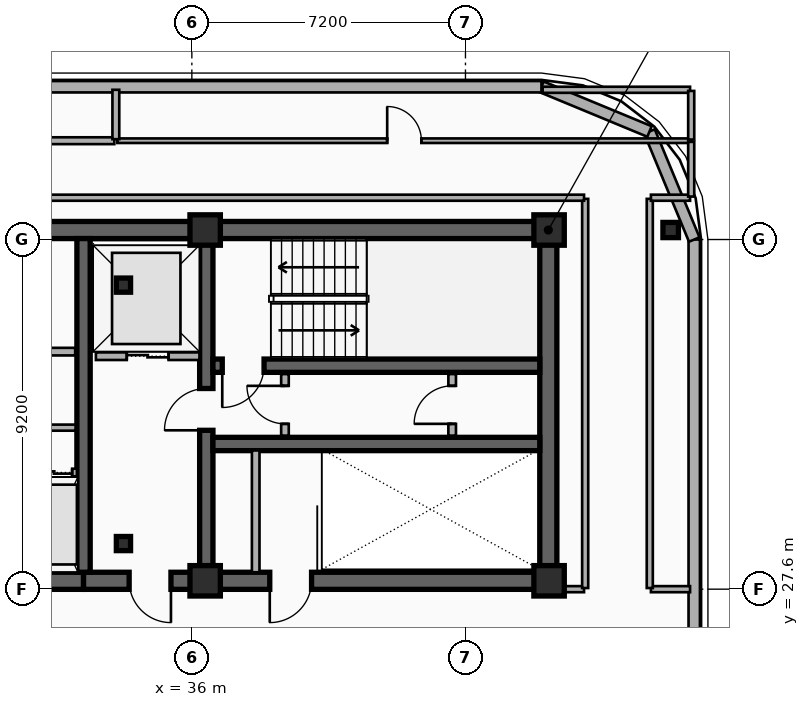
"""IFC4 building model, lengths in metres.
Left out: names, types, materials, properties, quantities, classifications, styles, units other than length and angle.
Written with IfcOpenShell. Run it as: python <this file> out.ifc"""

import sys

from ifc_helpers import new_model, si_unit, direction, frame, frame_2d, origin, origin_2d, place, context, subcontext, project, spatial, rectangle, i_section, extrude, element, fill, save


model = new_model("IFC4")
c1 = context("Model", 3, precision=1e-05, world=origin(), true_north=direction((0.0, 1.0)))
c2 = subcontext(c1, "Body", "Model", "MODEL_VIEW")
j1 = project(units=[si_unit("LENGTHUNIT", "METRE"), si_unit("PLANEANGLEUNIT", "RADIAN")], contexts=[c1])
p1 = place(None, origin())
s1 = spatial("IfcSite", under=j1, at=p1, CompositionType="ELEMENT")
p2 = place(p1, origin())
s2 = spatial("IfcBuilding", under=s1, at=p2, CompositionType="ELEMENT")
p3 = place(p2, frame((0.0, 0.0, 276.9)))
s3 = spatial("IfcBuildingStorey", under=s2, at=p3, CompositionType="ELEMENT", Elevation=276.9)
p4 = place(p3, frame((12.15, 37.05, 0.0), z_axis=(0.0, 0.0, 1.0), x_axis=(1.0, 0.0, 0.0)))
e1 = element("IfcWall", 1, at=p4, inside=s3, PredefinedType="SHEAR", context=c2, shape_type="SweptSolid", body=[
    extrude(rectangle(XDim=33.23, YDim=0.45, at=frame_2d((16.615, 0.0))), origin(), (0.0, 0.0, 1.0), 3.7),
])
p5 = place(p3, frame((33.15, 27.82, 0.0), z_axis=(0.0, 0.0, 1.0), x_axis=(-1.0, 0.0, 0.0)))
e2 = element("IfcWall", 2, at=p5, inside=s3, PredefinedType="SHEAR", context=c2, shape_type="SweptSolid", body=[
    extrude(rectangle(XDim=11.97, YDim=0.45, at=frame_2d((5.985, 0.0))), origin(), (0.0, 0.0, 1.0), 3.7),
])
p6 = place(p5, frame((6.1, 0.0, 0.0)))
e3 = element("IfcOpeningElement", 3, at=p6, cuts=e2, PredefinedType="OPENING", context=c2, shape_type="SweptSolid", body=[
    extrude(rectangle(XDim=1.6, YDim=2.2, at=frame_2d((0.8, 1.1))), frame((0.0, 0.235, 0.0), z_axis=(0.0, -1.0, 0.0), x_axis=(1.0, 0.0, 0.0)), (0.0, 0.0, 1.0), 0.47),
])
p7 = place(p3, frame((45.38, 27.82, 0.0), z_axis=(0.0, 0.0, 1.0), x_axis=(-1.0, 0.0, 0.0)))
e4 = element("IfcWall", 4, at=p7, inside=s3, PredefinedType="SHEAR", context=c2, shape_type="SweptSolid", body=[
    extrude(rectangle(XDim=12.23, YDim=0.45, at=frame_2d((6.115, 0.0))), origin(), (0.0, 0.0, 1.0), 3.7),
])
p8 = place(p7, frame((9.93, 0.0, 0.0)))
e5 = element("IfcOpeningElement", 5, at=p8, cuts=e4, PredefinedType="OPENING", context=c2, shape_type="SweptSolid", body=[
    extrude(rectangle(XDim=1.1, YDim=2.15, at=frame_2d((0.55, 1.075))), frame((0.0, 0.235, 0.0), z_axis=(0.0, -1.0, 0.0), x_axis=(1.0, 0.0, 0.0)), (0.0, 0.0, 1.0), 0.47),
])
p9 = place(p7, frame((6.23, 0.0, 0.0)))
e6 = element("IfcOpeningElement", 6, at=p9, cuts=e4, PredefinedType="OPENING", context=c2, shape_type="SweptSolid", body=[
    extrude(rectangle(XDim=1.1, YDim=2.15, at=frame_2d((0.55, 1.075))), frame((0.0, 0.235, 0.0), z_axis=(0.0, -1.0, 0.0), x_axis=(1.0, 0.0, 0.0)), (0.0, 0.0, 1.0), 0.47),
])
p10 = place(p3, frame((45.38, 28.045, 0.0), z_axis=(0.0, 0.0, 1.0), x_axis=(0.0, 1.0, 0.0)))
e7 = element("IfcWall", 7, at=p10, inside=s3, PredefinedType="SHEAR", context=c2, shape_type="SweptSolid", body=[
    extrude(rectangle(XDim=8.78, YDim=0.45, at=frame_2d((4.39, 0.0))), origin(), (0.0, 0.0, 1.0), 3.7),
])
p11 = place(p3, frame((33.15, 28.045, 0.0), z_axis=(0.0, 0.0, 1.0), x_axis=(0.0, 1.0, 0.0)))
e8 = element("IfcWall", 8, at=p11, inside=s3, PredefinedType="SHEAR", context=c2, shape_type="SweptSolid", body=[
    extrude(rectangle(XDim=8.78, YDim=0.35, at=frame_2d((4.39, 0.0))), origin(), (0.0, 0.0, 1.0), 3.7),
])
p12 = place(p3, frame((36.38, 28.045, 0.0), z_axis=(0.0, 0.0, 1.0), x_axis=(0.0, 1.0, 0.0)))
e9 = element("IfcWall", 9, at=p12, inside=s3, PredefinedType="SHEAR", context=c2, shape_type="SweptSolid", body=[
    extrude(rectangle(XDim=8.78, YDim=0.35, at=frame_2d((4.39, 0.0))), origin(), (0.0, 0.0, 1.0), 3.7),
])
p13 = place(p12, frame((3.735, 0.0, 0.0)))
e10 = element("IfcOpeningElement", 10, at=p13, cuts=e9, PredefinedType="OPENING", context=c2, shape_type="SweptSolid", body=[
    extrude(rectangle(XDim=1.1, YDim=2.15, at=frame_2d((0.55, 1.075))), frame((0.0, 0.185, 0.0), z_axis=(0.0, -1.0, 0.0), x_axis=(1.0, 0.0, 0.0)), (0.0, 0.0, 1.0), 0.37),
])
p14 = place(p3, frame((45.155, 33.48, 0.0), z_axis=(0.0, 0.0, 1.0), x_axis=(-1.0, 0.0, 0.0)))
e11 = element("IfcWall", 11, at=p14, inside=s3, PredefinedType="SHEAR", context=c2, shape_type="SweptSolid", body=[
    extrude(rectangle(XDim=8.6, YDim=0.35, at=frame_2d((4.3, 0.0))), origin(), (0.0, 0.0, 1.0), 3.7),
])
p15 = place(p14, frame((7.255, 0.0, 0.0)))
e12 = element("IfcOpeningElement", 12, at=p15, cuts=e11, PredefinedType="OPENING", context=c2, shape_type="SweptSolid", body=[
    extrude(rectangle(XDim=1.1, YDim=2.15, at=frame_2d((0.55, 1.075))), frame((0.0, 0.185, 0.0), z_axis=(0.0, -1.0, 0.0), x_axis=(1.0, 0.0, 0.0)), (0.0, 0.0, 1.0), 0.37),
])
p16 = place(p3, frame((36.555, 31.42, 0.0), z_axis=(0.0, 0.0, 1.0), x_axis=(1.0, 0.0, 0.0)))
e13 = element("IfcWall", 13, at=p16, inside=s3, PredefinedType="SHEAR", context=c2, shape_type="SweptSolid", body=[
    extrude(rectangle(XDim=8.6, YDim=0.35, at=frame_2d((4.3, 0.0))), origin(), (0.0, 0.0, 1.0), 3.7),
])
for number, where, z_axis, x_axis in (
    (14, (34.2, 28.8, 0.0), (0.0, 0.0, 1.0), (1.0, 0.0, 0.0)),
    (15, (34.2, 35.6, 0.0), (0.0, 0.0, 1.0), (1.0, 0.0, 0.0)),
):
    element("IfcColumn", number, at=place(p3, frame(where, z_axis=z_axis, x_axis=x_axis)), inside=s3, PredefinedType="COLUMN", context=c2, shape_type="SweptSolid", body=[
        extrude(i_section(OverallWidth=0.374, OverallDepth=0.372, WebThickness=0.017, FlangeThickness=0.027, FilletRadius=0.015, at=origin_2d()), origin(), (0.0, 0.0, 1.0), 3.7),
    ])
for number, where, z_axis, x_axis in (
    (16, (36.35, 27.82, 0.0), (0.0, 0.0, 1.0), (1.0, 0.0, 0.0)),
    (17, (36.35, 37.05, 0.0), (0.0, 0.0, 1.0), (1.0, 0.0, 0.0)),
    (18, (45.4, 27.82, 0.0), (0.0, 0.0, 1.0), (1.0, 0.0, 0.0)),
    (19, (45.4, 37.05, 0.0), (0.0, 0.0, 1.0), (1.0, 0.0, 0.0)),
):
    element("IfcColumn", number, at=place(p3, frame(where, z_axis=z_axis, x_axis=x_axis)), inside=s3, PredefinedType="COLUMN", context=c2, shape_type="SweptSolid", body=[
        extrude(rectangle(XDim=0.8, YDim=0.8, at=origin_2d()), origin(), (0.0, 0.0, 1.0), 3.7),
    ])
p17 = place(p3, frame((48.6, 37.05, 0.0), z_axis=(0.0, 0.0, 1.0), x_axis=(1.0, 0.0, 0.0)))
e20 = element("IfcColumn", 20, at=p17, inside=s3, PredefinedType="COLUMN", context=c2, shape_type="SweptSolid", body=[
    extrude(i_section(OverallWidth=0.408, OverallDepth=0.4, WebThickness=0.025, FlangeThickness=0.039, FilletRadius=0.015, at=origin_2d()), origin(), (0.0, 0.0, 1.0), 3.7),
])
p18 = place(p3, frame((49.22, 36.8, 0.0), z_axis=(0.0, 0.0, 1.0), x_axis=(0.0, -1.0, 0.0)))
e21 = element("IfcWall", 21, at=p18, inside=s3, PredefinedType="SOLIDWALL", context=c2, shape_type="SweptSolid", body=[
    extrude(rectangle(XDim=34.2, YDim=0.3, at=frame_2d((17.1, 0.0))), origin(), (0.0, 0.0, 1.0), 3.38),
])
p19 = place(p18, frame((21.127, 0.0, 0.75)))
e22 = element("IfcOpeningElement", 22, at=p19, cuts=e21, PredefinedType="OPENING", context=c2, shape_type="SweptSolid", body=[
    extrude(rectangle(XDim=2.1, YDim=2.1, at=frame_2d((1.05, 1.05))), frame((0.0, 0.16, 0.0), z_axis=(0.0, -1.0, 0.0), x_axis=(1.0, 0.0, 0.0)), (0.0, 0.0, 1.0), 0.32),
])
p20 = place(p18, frame((27.503, 0.0, 0.75)))
e23 = element("IfcOpeningElement", 23, at=p20, cuts=e21, PredefinedType="OPENING", context=c2, shape_type="SweptSolid", body=[
    extrude(rectangle(XDim=2.1, YDim=2.1, at=frame_2d((1.05, 1.05))), frame((0.0, 0.16, 0.0), z_axis=(0.0, -1.0, 0.0), x_axis=(1.0, 0.0, 0.0)), (0.0, 0.0, 1.0), 0.32),
])
for number, where, z_axis, x_axis in (
    (24, (48.042, 39.643, 0.0), (0.0, 0.0, 1.0), (0.383, -0.924, 0.0)),
    (25, (45.2, 40.82, 0.0), (0.0, 0.0, 1.0), (0.924, -0.383, 0.0)),
):
    element("IfcWall", number, at=place(p3, frame(where, z_axis=z_axis, x_axis=x_axis)), inside=s3, PredefinedType="SOLIDWALL", context=c2, shape_type="SweptSolid", body=[
        extrude(rectangle(XDim=3.077, YDim=0.3, at=frame_2d((1.538, 0.0))), origin(), (0.0, 0.0, 1.0), 3.38),
    ])
p21 = place(p3, frame((12.4, 40.82, 0.0), z_axis=(0.0, 0.0, 1.0), x_axis=(1.0, 0.0, 0.0)))
e26 = element("IfcWall", 26, at=p21, inside=s3, PredefinedType="SOLIDWALL", context=c2, shape_type="SweptSolid", body=[
    extrude(rectangle(XDim=32.8, YDim=0.3, at=frame_2d((16.4, 0.0))), origin(), (0.0, 0.0, 1.0), 3.38),
])
p22 = place(p21, frame((3.38, 0.0, 0.75)))
e27 = element("IfcOpeningElement", 27, at=p22, cuts=e26, PredefinedType="OPENING", context=c2, shape_type="SweptSolid", body=[
    extrude(rectangle(XDim=2.1, YDim=2.1, at=frame_2d((1.05, 1.05))), frame((0.0, 0.16, 0.0), z_axis=(0.0, -1.0, 0.0), x_axis=(1.0, 0.0, 0.0)), (0.0, 0.0, 1.0), 0.32),
])
p23 = place(p21, frame((8.54, 0.0, 0.75)))
e28 = element("IfcOpeningElement", 28, at=p23, cuts=e26, PredefinedType="OPENING", context=c2, shape_type="SweptSolid", body=[
    extrude(rectangle(XDim=2.1, YDim=2.1, at=frame_2d((1.05, 1.05))), frame((0.0, 0.16, 0.0), z_axis=(0.0, -1.0, 0.0), x_axis=(1.0, 0.0, 0.0)), (0.0, 0.0, 1.0), 0.32),
])
p24 = place(p3, frame((33.475, 33.73, 0.0), z_axis=(0.0, 0.0, 1.0), x_axis=(1.0, 0.0, 0.0)))
e29 = element("IfcWall", 29, at=p24, inside=s3, PredefinedType="PARTITIONING", context=c2, shape_type="SweptSolid", body=[
    extrude(rectangle(XDim=2.725, YDim=0.2, at=frame_2d((1.362, 0.0))), origin(), (0.0, 0.0, 1.0), 2.45),
])
p25 = place(p24, frame((0.812, 0.0, 0.0)))
e30 = element("IfcOpeningElement", 30, at=p25, cuts=e29, PredefinedType="OPENING", context=c2, shape_type="SweptSolid", body=[
    extrude(rectangle(XDim=1.1, YDim=2.15, at=frame_2d((0.55, 1.075))), frame((0.0, 0.11, 0.0), z_axis=(0.0, -1.0, 0.0), x_axis=(1.0, 0.0, 0.0)), (0.0, 0.0, 1.0), 0.22),
])
p26 = place(p3, frame((31.775, 30.67, 0.0), z_axis=(0.0, 0.0, 1.0), x_axis=(1.0, 0.0, 0.0)))
e31 = element("IfcWall", 31, at=p26, inside=s3, PredefinedType="PARTITIONING", context=c2, shape_type="SweptSolid", body=[
    extrude(rectangle(XDim=1.2, YDim=0.2, at=frame_2d((0.6, 0.0))), origin(), (0.0, 0.0, 1.0), 2.76),
])
p27 = place(p26, frame((0.125, 0.0, 0.0)))
e32 = element("IfcOpeningElement", 32, at=p27, cuts=e31, PredefinedType="OPENING", context=c2, shape_type="SweptSolid", body=[
    extrude(rectangle(XDim=0.95, YDim=2.15, at=frame_2d((0.475, 1.075))), frame((0.0, 0.11, 0.0), z_axis=(0.0, -1.0, 0.0), x_axis=(1.0, 0.0, 0.0)), (0.0, 0.0, 1.0), 0.22),
])
p28 = place(p3, frame((37.68, 28.045, 0.0), z_axis=(0.0, 0.0, 1.0), x_axis=(0.0, 1.0, 0.0)))
e33 = element("IfcWall", 33, at=p28, inside=s3, PredefinedType="PARTITIONING", context=c2, shape_type="SweptSolid", body=[
    extrude(rectangle(XDim=3.205, YDim=0.2, at=frame_2d((1.603, 0.0))), origin(), (0.0, 0.0, 1.0), 2.76),
])
p29 = place(p3, frame((38.45, 31.64, 0.0), z_axis=(0.0, 0.0, 1.0), x_axis=(0.0, 1.0, 0.0)))
e34 = element("IfcWall", 34, at=p29, inside=s3, PredefinedType="PARTITIONING", context=c2, shape_type="SweptSolid", body=[
    extrude(rectangle(XDim=1.62, YDim=0.2, at=frame_2d((0.81, 0.0))), origin(), (0.0, 0.0, 1.0), 3.38),
])
p30 = place(p29, frame((0.31, 0.0, 0.0)))
e35 = element("IfcOpeningElement", 35, at=p30, cuts=e34, PredefinedType="OPENING", context=c2, shape_type="SweptSolid", body=[
    extrude(rectangle(XDim=1.0, YDim=2.15, at=frame_2d((0.5, 1.075))), frame((0.0, 0.11, 0.0), z_axis=(0.0, -1.0, 0.0), x_axis=(1.0, 0.0, 0.0)), (0.0, 0.0, 1.0), 0.22),
])
p31 = place(p3, frame((42.85, 31.64, 0.0), z_axis=(0.0, 0.0, 1.0), x_axis=(0.0, 1.0, 0.0)))
e36 = element("IfcWall", 36, at=p31, inside=s3, PredefinedType="PARTITIONING", context=c2, shape_type="SweptSolid", body=[
    extrude(rectangle(XDim=1.62, YDim=0.2, at=frame_2d((0.81, 0.0))), origin(), (0.0, 0.0, 1.0), 3.38),
])
p32 = place(p31, frame((0.31, 0.0, 0.0)))
e37 = element("IfcOpeningElement", 37, at=p32, cuts=e36, PredefinedType="OPENING", context=c2, shape_type="SweptSolid", body=[
    extrude(rectangle(XDim=1.0, YDim=2.15, at=frame_2d((0.5, 1.075))), frame((0.0, 0.11, 0.0), z_axis=(0.0, -1.0, 0.0), x_axis=(1.0, 0.0, 0.0)), (0.0, 0.0, 1.0), 0.22),
])
p33 = place(p3, frame((29.09, 33.85, 0.0), z_axis=(0.0, 0.0, 1.0), x_axis=(1.0, 0.0, 0.0)))
e38 = element("IfcWall", 38, at=p33, inside=s3, PredefinedType="PARTITIONING", context=c2, shape_type="SweptSolid", body=[
    extrude(rectangle(XDim=3.84, YDim=0.2, at=frame_2d((1.92, 0.0))), origin(), (0.0, 0.0, 1.0), 2.45),
])
p34 = place(p33, frame((1.32, 0.0, 0.0)))
e39 = element("IfcOpeningElement", 39, at=p34, cuts=e38, PredefinedType="OPENING", context=c2, shape_type="SweptSolid", body=[
    extrude(rectangle(XDim=1.2, YDim=2.15, at=frame_2d((0.6, 1.075))), frame((0.0, 0.11, 0.0), z_axis=(0.0, -1.0, 0.0), x_axis=(1.0, 0.0, 0.0)), (0.0, 0.0, 1.0), 0.22),
])
p35 = place(p3, frame((26.44, 39.4, 0.0), z_axis=(0.0, 0.0, 1.0), x_axis=(1.0, 0.0, 0.0)))
e40 = element("IfcWall", 40, at=p35, inside=s3, PredefinedType="PLUMBINGWALL", context=c2, shape_type="SweptSolid", body=[
    extrude(rectangle(XDim=7.52, YDim=0.18, at=frame_2d((3.76, 0.0))), origin(), (0.0, 0.0, 1.0), 3.38),
])
p36 = place(p35, frame((3.335, 0.0, 0.0)))
e41 = element("IfcOpeningElement", 41, at=p36, cuts=e40, PredefinedType="OPENING", context=c2, shape_type="SweptSolid", body=[
    extrude(rectangle(XDim=0.85, YDim=2.1, at=frame_2d((0.425, 1.05))), frame((0.0, 0.1, 0.0), z_axis=(0.0, -1.0, 0.0), x_axis=(1.0, 0.0, 0.0)), (0.0, 0.0, 1.0), 0.2),
])
p37 = place(p3, frame((34.04, 39.4, 0.0), z_axis=(0.0, 0.0, 1.0), x_axis=(1.0, 0.0, 0.0)))
e42 = element("IfcWall", 42, at=p37, inside=s3, PredefinedType="PARTITIONING", context=c2, shape_type="SweptSolid", body=[
    extrude(rectangle(XDim=15.1, YDim=0.12, at=frame_2d((7.55, 0.0))), origin(), (0.0, 0.0, 1.0), 3.38),
])
p38 = place(p37, frame((7.1, 0.0, 0.0)))
e43 = element("IfcOpeningElement", 43, at=p38, cuts=e42, PredefinedType="OPENING", context=c2, shape_type="SweptSolid", body=[
    extrude(rectangle(XDim=0.9, YDim=2.1, at=frame_2d((0.45, 1.05))), frame((0.0, 0.07, 0.0), z_axis=(0.0, -1.0, 0.0), x_axis=(1.0, 0.0, 0.0)), (0.0, 0.0, 1.0), 0.14),
])
p39 = place(p3, frame((34.0, 39.44, 0.0), z_axis=(0.0, 0.0, 1.0), x_axis=(0.0, 1.0, 0.0)))
e44 = element("IfcWall", 44, at=p39, inside=s3, PredefinedType="PLUMBINGWALL", context=c2, shape_type="SweptSolid", body=[
    extrude(rectangle(XDim=1.3, YDim=0.18, at=frame_2d((0.65, 0.0))), origin(), (0.0, 0.0, 1.0), 3.38),
])
p40 = place(p3, frame((27.63, 31.85, 0.0), z_axis=(0.0, 0.0, 1.0), x_axis=(1.0, 0.0, 0.0)))
e45 = element("IfcWall", 45, at=p40, inside=s3, PredefinedType="PARTITIONING", context=c2, shape_type="SweptSolid", body=[
    extrude(rectangle(XDim=5.31, YDim=0.16, at=frame_2d((2.655, 0.0))), origin(), (0.0, 0.0, 1.0), 2.45),
])
p41 = place(p3, frame((45.41, 27.6, 0.0), z_axis=(0.0, 0.0, 1.0), x_axis=(1.0, 0.0, 0.0)))
e46 = element("IfcWall", 46, at=p41, inside=s3, PredefinedType="PARTITIONING", context=c2, shape_type="SweptSolid", body=[
    extrude(rectangle(XDim=0.91, YDim=0.16, at=frame_2d((0.455, 0.0))), origin(), (0.0, 0.0, 1.0), 2.45),
])
p42 = place(p3, frame((48.08, 27.6, 0.0), z_axis=(0.0, 0.0, 1.0), x_axis=(1.0, 0.0, 0.0)))
e47 = element("IfcWall", 47, at=p42, inside=s3, PredefinedType="PARTITIONING", context=c2, shape_type="SweptSolid", body=[
    extrude(rectangle(XDim=1.03, YDim=0.16, at=frame_2d((0.515, 0.0))), origin(), (0.0, 0.0, 1.0), 3.38),
])
for number, where, z_axis, x_axis in (
    (48, (46.35, 27.63, 0.0), (0.0, 0.0, 1.0), (0.0, 1.0, 0.0)),
    (49, (48.05, 27.63, 0.0), (0.0, 0.0, 1.0), (0.0, 1.0, 0.0)),
):
    element("IfcWall", number, at=place(p3, frame(where, z_axis=z_axis, x_axis=x_axis)), inside=s3, PredefinedType="PARTITIONING", context=c2, shape_type="SweptSolid", body=[
        extrude(rectangle(XDim=10.24, YDim=0.16, at=frame_2d((5.12, 0.0))), origin(), (0.0, 0.0, 1.0), 2.86),
    ])
p43 = place(p3, frame((11.28, 37.9, 0.0), z_axis=(0.0, 0.0, 1.0), x_axis=(1.0, 0.0, 0.0)))
e50 = element("IfcWall", 50, at=p43, inside=s3, PredefinedType="PARTITIONING", context=c2, shape_type="SweptSolid", body=[
    extrude(rectangle(XDim=35.04, YDim=0.16, at=frame_2d((17.52, 0.0))), origin(), (0.0, 0.0, 1.0), 3.38),
])
p44 = place(p3, frame((48.08, 37.9, 0.0), z_axis=(0.0, 0.0, 1.0), x_axis=(1.0, 0.0, 0.0)))
e51 = element("IfcWall", 51, at=p44, inside=s3, PredefinedType="PARTITIONING", context=c2, shape_type="SweptSolid", body=[
    extrude(rectangle(XDim=1.03, YDim=0.16, at=frame_2d((0.515, 0.0))), origin(), (0.0, 0.0, 1.0), 3.38),
])
p45 = place(p3, frame((49.14, 37.93, 0.0), z_axis=(0.0, 0.0, 1.0), x_axis=(0.0, 1.0, 0.0)))
e52 = element("IfcWall", 52, at=p45, inside=s3, PredefinedType="PARTITIONING", context=c2, shape_type="SweptSolid", body=[
    extrude(rectangle(XDim=1.44, YDim=0.16, at=frame_2d((0.72, 0.0))), origin(), (0.0, 0.0, 1.0), 3.38),
])
p46 = place(p3, frame((45.23, 40.74, 0.0), z_axis=(0.0, 0.0, 1.0), x_axis=(1.0, 0.0, 0.0)))
e53 = element("IfcWall", 53, at=p46, inside=s3, PredefinedType="PARTITIONING", context=c2, shape_type="SweptSolid", body=[
    extrude(rectangle(XDim=3.88, YDim=0.16, at=frame_2d((1.94, 0.0))), origin(), (0.0, 0.0, 1.0), 3.38),
])
p47 = place(p3, frame((49.14, 39.43, 0.0), z_axis=(0.0, 0.0, 1.0), x_axis=(0.0, 1.0, 0.0)))
e54 = element("IfcWall", 54, at=p47, inside=s3, PredefinedType="PARTITIONING", context=c2, shape_type="SweptSolid", body=[
    extrude(rectangle(XDim=1.28, YDim=0.16, at=frame_2d((0.64, 0.0))), origin(), (0.0, 0.0, 1.0), 3.38),
])
p48 = place(p25, origin())
e55 = element("IfcDoor", 55, at=p48, inside=s3, OperationType="DOUBLE_DOOR_SLIDING", PredefinedType="DOOR", context=c2, shape_type="SweptSolid", body=[
    extrude(rectangle(XDim=1.1, YDim=2.15, at=frame_2d((0.55, 1.075))), frame((0.0, 0.025, 0.0), z_axis=(0.0, -1.0, 0.0), x_axis=(1.0, 0.0, 0.0)), (0.0, 0.0, 1.0), 0.05),
])
fill(e30, e55)
p49 = place(p27, origin())
e56 = element("IfcDoor", 56, at=p49, inside=s3, OperationType="DOUBLE_DOOR_SLIDING", PredefinedType="DOOR", context=c2, shape_type="SweptSolid", body=[
    extrude(rectangle(XDim=0.95, YDim=2.15, at=frame_2d((0.475, 1.075))), frame((0.0, 0.025, 0.0), z_axis=(0.0, -1.0, 0.0), x_axis=(1.0, 0.0, 0.0)), (0.0, 0.0, 1.0), 0.05),
])
fill(e32, e56)
p50 = place(p15, origin())
e57 = element("IfcDoor", 57, at=p50, inside=s3, OperationType="SINGLE_SWING_RIGHT", PredefinedType="DOOR", context=c2, shape_type="SweptSolid", body=[
    extrude(rectangle(XDim=1.1, YDim=2.15, at=frame_2d((0.55, 1.075))), frame((0.0, 0.025, 0.0), z_axis=(0.0, -1.0, 0.0), x_axis=(1.0, 0.0, 0.0)), (0.0, 0.0, 1.0), 0.05),
])
fill(e12, e57)
p51 = place(p13, origin())
e58 = element("IfcDoor", 58, at=p51, inside=s3, OperationType="SINGLE_SWING_LEFT", PredefinedType="DOOR", context=c2, shape_type="SweptSolid", body=[
    extrude(rectangle(XDim=1.1, YDim=2.15, at=frame_2d((0.55, 1.075))), frame((0.0, 0.025, 0.0), z_axis=(0.0, -1.0, 0.0), x_axis=(1.0, 0.0, 0.0)), (0.0, 0.0, 1.0), 0.05),
])
fill(e10, e58)
p52 = place(p8, origin())
e59 = element("IfcDoor", 59, at=p52, inside=s3, OperationType="SINGLE_SWING_LEFT", PredefinedType="DOOR", context=c2, shape_type="SweptSolid", body=[
    extrude(rectangle(XDim=1.1, YDim=2.15, at=frame_2d((0.55, 1.075))), frame((0.0, 0.025, 0.0), z_axis=(0.0, -1.0, 0.0), x_axis=(1.0, 0.0, 0.0)), (0.0, 0.0, 1.0), 0.05),
])
fill(e5, e59)
p53 = place(p9, origin())
e60 = element("IfcDoor", 60, at=p53, inside=s3, OperationType="SINGLE_SWING_RIGHT", PredefinedType="DOOR", context=c2, shape_type="SweptSolid", body=[
    extrude(rectangle(XDim=1.1, YDim=2.15, at=frame_2d((0.55, 1.075))), frame((0.0, 0.025, 0.0), z_axis=(0.0, -1.0, 0.0), x_axis=(1.0, 0.0, 0.0)), (0.0, 0.0, 1.0), 0.05),
])
fill(e6, e60)
p54 = place(p30, origin())
e61 = element("IfcDoor", 61, at=p54, inside=s3, OperationType="SINGLE_SWING_RIGHT", PredefinedType="DOOR", context=c2, shape_type="SweptSolid", body=[
    extrude(rectangle(XDim=1.0, YDim=2.15, at=frame_2d((0.5, 1.075))), frame((0.0, 0.025, 0.0), z_axis=(0.0, -1.0, 0.0), x_axis=(1.0, 0.0, 0.0)), (0.0, 0.0, 1.0), 0.05),
])
fill(e35, e61)
p55 = place(p32, origin())
e62 = element("IfcDoor", 62, at=p55, inside=s3, OperationType="SINGLE_SWING_LEFT", PredefinedType="DOOR", context=c2, shape_type="SweptSolid", body=[
    extrude(rectangle(XDim=1.0, YDim=2.15, at=frame_2d((0.5, 1.075))), frame((0.0, 0.025, 0.0), z_axis=(0.0, -1.0, 0.0), x_axis=(1.0, 0.0, 0.0)), (0.0, 0.0, 1.0), 0.05),
])
fill(e37, e62)
p56 = place(p38, origin())
e63 = element("IfcDoor", 63, at=p56, inside=s3, OperationType="SINGLE_SWING_LEFT", PredefinedType="DOOR", context=c2, shape_type="SweptSolid", body=[
    extrude(rectangle(XDim=0.9, YDim=2.1, at=frame_2d((0.45, 1.05))), frame((0.0, 0.025, 0.0), z_axis=(0.0, -1.0, 0.0), x_axis=(1.0, 0.0, 0.0)), (0.0, 0.0, 1.0), 0.05),
])
fill(e43, e63)
save(model, sys.argv[1])
